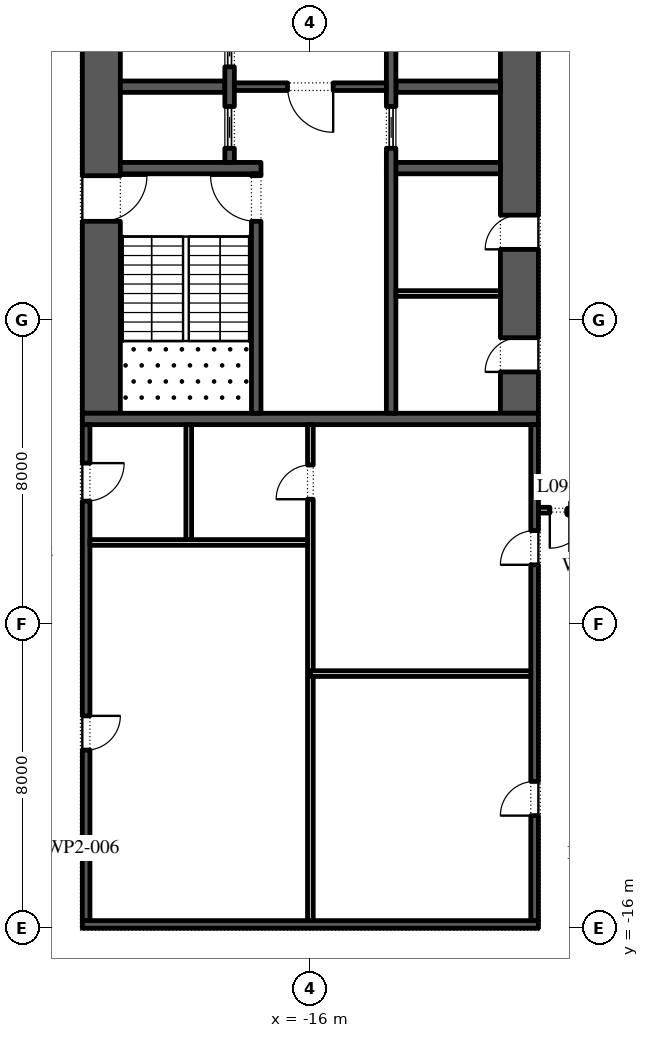
"""IFC4 building model, lengths in metres.
Left out: names, types, materials, properties, quantities, classifications, styles, units other than length and angle.
Written with IfcOpenShell. Run it as: python <this file> out.ifc"""

import sys

from ifc_helpers import new_model, si_unit, direction, frame, frame_2d, origin, place, context, subcontext, project, spatial, rectangle, extrude, element, fill, save


model = new_model("IFC4")
c1 = context("Model", 3, precision=1e-05, world=origin(), true_north=direction((0.0, 1.0)))
c2 = subcontext(c1, "Body", "Model", "MODEL_VIEW")
j1 = project(units=[si_unit("LENGTHUNIT", "METRE"), si_unit("PLANEANGLEUNIT", "RADIAN")], contexts=[c1])
p1 = place(None, origin())
s1 = spatial("IfcSite", under=j1, at=p1, CompositionType="ELEMENT")
p2 = place(p1, origin())
s2 = spatial("IfcBuilding", under=s1, at=p2, CompositionType="ELEMENT")
p3 = place(p2, frame((0.0, 0.0, 48.0)))
s3 = spatial("IfcBuildingStorey", under=s2, at=p3, CompositionType="ELEMENT", Elevation=48.0)
p4 = place(p3, frame((-21.5, -2.45, 0.0), z_axis=(0.0, 0.0, 1.0), x_axis=(0.0, 1.0, 0.0)))
e1 = element("IfcWall", 1, at=p4, inside=s3, PredefinedType="SHEAR", context=c2, shape_type="SweptSolid", body=[
    extrude(rectangle(XDim=27.9, YDim=1.0, at=frame_2d((13.95, 0.0))), origin(), (0.0, 0.0, 1.0), 4.0),
])
p5 = place(p4, frame((5.05, 0.0, 0.0)))
e2 = element("IfcOpeningElement", 2, at=p5, cuts=e1, PredefinedType="OPENING", context=c2, shape_type="SweptSolid", body=[
    extrude(rectangle(XDim=1.2, YDim=2.1, at=frame_2d((0.6, 1.05))), frame((0.0, 0.51, 0.0), z_axis=(0.0, -1.0, 0.0), x_axis=(1.0, 0.0, 0.0)), (0.0, 0.0, 1.0), 1.02),
])
p6 = place(p4, frame((21.65, 0.0, 0.0)))
e3 = element("IfcOpeningElement", 3, at=p6, cuts=e1, PredefinedType="OPENING", context=c2, shape_type="SweptSolid", body=[
    extrude(rectangle(XDim=1.2, YDim=2.1, at=frame_2d((0.6, 1.05))), frame((0.0, 0.51, 0.0), z_axis=(0.0, -1.0, 0.0), x_axis=(1.0, 0.0, 0.0)), (0.0, 0.0, 1.0), 1.02),
])
p7 = place(p3, frame((-10.5, -2.45, 0.0), z_axis=(0.0, 0.0, 1.0), x_axis=(0.0, 1.0, 0.0)))
e4 = element("IfcWall", 4, at=p7, inside=s3, PredefinedType="SHEAR", context=c2, shape_type="SweptSolid", body=[
    extrude(rectangle(XDim=27.9, YDim=1.0, at=frame_2d((13.95, 0.0))), origin(), (0.0, 0.0, 1.0), 4.0),
])
p8 = place(p7, frame((23.65, 0.0, 0.0)))
e5 = element("IfcOpeningElement", 5, at=p8, cuts=e4, PredefinedType="OPENING", context=c2, shape_type="SweptSolid", body=[
    extrude(rectangle(XDim=2.4, YDim=2.1, at=frame_2d((1.2, 1.05))), frame((0.0, 0.51, 0.0), z_axis=(0.0, -1.0, 0.0), x_axis=(1.0, 0.0, 0.0)), (0.0, 0.0, 1.0), 1.02),
])
p9 = place(p7, frame((1.087, 0.0, 0.0)))
e6 = element("IfcOpeningElement", 6, at=p9, cuts=e4, PredefinedType="OPENING", context=c2, shape_type="SweptSolid", body=[
    extrude(rectangle(XDim=0.9, YDim=2.1, at=frame_2d((0.45, 1.05))), frame((0.0, 0.51, 0.0), z_axis=(0.0, -1.0, 0.0), x_axis=(1.0, 0.0, 0.0)), (0.0, 0.0, 1.0), 1.02),
])
p10 = place(p7, frame((4.312, 0.0, 0.0)))
e7 = element("IfcOpeningElement", 7, at=p10, cuts=e4, PredefinedType="OPENING", context=c2, shape_type="SweptSolid", body=[
    extrude(rectangle(XDim=0.9, YDim=2.1, at=frame_2d((0.45, 1.05))), frame((0.0, 0.51, 0.0), z_axis=(0.0, -1.0, 0.0), x_axis=(1.0, 0.0, 0.0)), (0.0, 0.0, 1.0), 1.02),
])
p11 = place(p3, frame((-22.0, -2.6, 0.0), z_axis=(0.0, 0.0, 1.0), x_axis=(1.0, 0.0, 0.0)))
e8 = element("IfcWall", 8, at=p11, inside=s3, PredefinedType="SHEAR", context=c2, shape_type="SweptSolid", body=[
    extrude(rectangle(XDim=12.0, YDim=0.3, at=frame_2d((6.0, 0.0))), origin(), (0.0, 0.0, 1.0), 4.0),
])
p12 = place(p3, frame((-21.0, 4.0, 0.0), z_axis=(0.0, 0.0, 1.0), x_axis=(1.0, 0.0, 0.0)))
e9 = element("IfcWall", 9, at=p12, inside=s3, PredefinedType="SHEAR", context=c2, shape_type="SweptSolid", body=[
    extrude(rectangle(XDim=3.7, YDim=0.3, at=frame_2d((1.85, 0.0))), origin(), (0.0, 0.0, 1.0), 4.0),
])
p13 = place(p3, frame((-17.425, -2.45, 0.0), z_axis=(0.0, 0.0, 1.0), x_axis=(0.0, 1.0, 0.0)))
e10 = element("IfcWall", 10, at=p13, inside=s3, PredefinedType="SHEAR", context=c2, shape_type="SweptSolid", body=[
    extrude(rectangle(XDim=6.3, YDim=0.25, at=frame_2d((3.15, 0.0))), origin(), (0.0, 0.0, 1.0), 4.0),
])
p14 = place(p13, frame((5.05, 0.0, 0.0)))
e11 = element("IfcOpeningElement", 11, at=p14, cuts=e10, PredefinedType="OPENING", context=c2, shape_type="SweptSolid", body=[
    extrude(rectangle(XDim=1.2, YDim=2.1, at=frame_2d((0.6, 1.05))), frame((0.0, 0.135, 0.0), z_axis=(0.0, -1.0, 0.0), x_axis=(1.0, 0.0, 0.0)), (0.0, 0.0, 1.0), 0.27),
])
p15 = place(p3, frame((-21.0, 6.143, 0.0), z_axis=(0.0, 0.0, 1.0), x_axis=(1.0, 0.0, 0.0)))
e12 = element("IfcWall", 12, at=p15, inside=s3, PredefinedType="SHEAR", context=c2, shape_type="SweptSolid", body=[
    extrude(rectangle(XDim=2.75, YDim=0.3, at=frame_2d((1.375, 0.0))), origin(), (0.0, 0.0, 1.0), 4.0),
])
p16 = place(p3, frame((-18.125, 4.15, 0.0), z_axis=(0.0, 0.0, 1.0), x_axis=(0.0, 1.0, 0.0)))
e13 = element("IfcWall", 13, at=p16, inside=s3, PredefinedType="SHEAR", context=c2, shape_type="SweptSolid", body=[
    extrude(rectangle(XDim=14.7, YDim=0.25, at=frame_2d((7.35, 0.0))), origin(), (0.0, 0.0, 1.0), 4.0),
])
p17 = place(p16, frame((0.371, 0.0, 0.0)))
e14 = element("IfcOpeningElement", 14, at=p17, cuts=e13, PredefinedType="OPENING", context=c2, shape_type="SweptSolid", body=[
    extrude(rectangle(XDim=1.1, YDim=2.1, at=frame_2d((0.55, 1.05))), frame((0.0, 0.135, 0.0), z_axis=(0.0, -1.0, 0.0), x_axis=(1.0, 0.0, 0.0)), (0.0, 0.0, 1.0), 0.27),
])
p18 = place(p16, frame((2.514, 0.0, 0.0)))
e15 = element("IfcOpeningElement", 15, at=p18, cuts=e13, PredefinedType="OPENING", context=c2, shape_type="SweptSolid", body=[
    extrude(rectangle(XDim=1.1, YDim=2.1, at=frame_2d((0.55, 1.05))), frame((0.0, 0.135, 0.0), z_axis=(0.0, -1.0, 0.0), x_axis=(1.0, 0.0, 0.0)), (0.0, 0.0, 1.0), 0.27),
])
p19 = place(p16, frame((4.657, 0.0, 0.0)))
e16 = element("IfcOpeningElement", 16, at=p19, cuts=e13, PredefinedType="OPENING", context=c2, shape_type="SweptSolid", body=[
    extrude(rectangle(XDim=1.1, YDim=2.1, at=frame_2d((0.55, 1.05))), frame((0.0, 0.135, 0.0), z_axis=(0.0, -1.0, 0.0), x_axis=(1.0, 0.0, 0.0)), (0.0, 0.0, 1.0), 0.27),
])
p20 = place(p16, frame((6.8, 0.0, 0.0)))
e17 = element("IfcOpeningElement", 17, at=p20, cuts=e13, PredefinedType="OPENING", context=c2, shape_type="SweptSolid", body=[
    extrude(rectangle(XDim=1.1, YDim=2.1, at=frame_2d((0.55, 1.05))), frame((0.0, 0.135, 0.0), z_axis=(0.0, -1.0, 0.0), x_axis=(1.0, 0.0, 0.0)), (0.0, 0.0, 1.0), 0.27),
])
p21 = place(p16, frame((8.943, 0.0, 0.0)))
e18 = element("IfcOpeningElement", 18, at=p21, cuts=e13, PredefinedType="OPENING", context=c2, shape_type="SweptSolid", body=[
    extrude(rectangle(XDim=1.1, YDim=2.1, at=frame_2d((0.55, 1.05))), frame((0.0, 0.135, 0.0), z_axis=(0.0, -1.0, 0.0), x_axis=(1.0, 0.0, 0.0)), (0.0, 0.0, 1.0), 0.27),
])
p22 = place(p16, frame((11.086, 0.0, 0.0)))
e19 = element("IfcOpeningElement", 19, at=p22, cuts=e13, PredefinedType="OPENING", context=c2, shape_type="SweptSolid", body=[
    extrude(rectangle(XDim=1.1, YDim=2.1, at=frame_2d((0.55, 1.05))), frame((0.0, 0.135, 0.0), z_axis=(0.0, -1.0, 0.0), x_axis=(1.0, 0.0, 0.0)), (0.0, 0.0, 1.0), 0.27),
])
p23 = place(p16, frame((13.229, 0.0, 0.0)))
e20 = element("IfcOpeningElement", 20, at=p23, cuts=e13, PredefinedType="OPENING", context=c2, shape_type="SweptSolid", body=[
    extrude(rectangle(XDim=1.1, YDim=2.1, at=frame_2d((0.55, 1.05))), frame((0.0, 0.135, 0.0), z_axis=(0.0, -1.0, 0.0), x_axis=(1.0, 0.0, 0.0)), (0.0, 0.0, 1.0), 0.27),
])
p24 = place(p3, frame((-14.0, 4.0, 0.0), z_axis=(0.0, 0.0, 1.0), x_axis=(1.0, 0.0, 0.0)))
e21 = element("IfcWall", 21, at=p24, inside=s3, PredefinedType="SHEAR", context=c2, shape_type="SweptSolid", body=[
    extrude(rectangle(XDim=3.0, YDim=0.3, at=frame_2d((1.5, 0.0))), origin(), (0.0, 0.0, 1.0), 4.0),
])
p25 = place(p3, frame((-13.75, 6.143, 0.0), z_axis=(0.0, 0.0, 1.0), x_axis=(1.0, 0.0, 0.0)))
e22 = element("IfcWall", 22, at=p25, inside=s3, PredefinedType="SHEAR", context=c2, shape_type="SweptSolid", body=[
    extrude(rectangle(XDim=2.75, YDim=0.3, at=frame_2d((1.375, 0.0))), origin(), (0.0, 0.0, 1.0), 4.0),
])
p26 = place(p3, frame((-13.875, -2.45, 0.0), z_axis=(0.0, 0.0, 1.0), x_axis=(0.0, 1.0, 0.0)))
e23 = element("IfcWall", 23, at=p26, inside=s3, PredefinedType="SHEAR", context=c2, shape_type="SweptSolid", body=[
    extrude(rectangle(XDim=21.3, YDim=0.25, at=frame_2d((10.65, 0.0))), origin(), (0.0, 0.0, 1.0), 4.0),
])
p27 = place(p26, frame((14.571, 0.0, 0.0)))
e24 = element("IfcOpeningElement", 24, at=p27, cuts=e23, PredefinedType="OPENING", context=c2, shape_type="SweptSolid", body=[
    extrude(rectangle(XDim=0.9, YDim=2.1, at=frame_2d((0.45, 1.05))), frame((0.0, 0.135, 0.0), z_axis=(0.0, -1.0, 0.0), x_axis=(1.0, 0.0, 0.0)), (0.0, 0.0, 1.0), 0.27),
])
p28 = place(p26, frame((6.971, 0.0, 0.0)))
e25 = element("IfcOpeningElement", 25, at=p28, cuts=e23, PredefinedType="OPENING", context=c2, shape_type="SweptSolid", body=[
    extrude(rectangle(XDim=1.1, YDim=2.1, at=frame_2d((0.55, 1.05))), frame((0.0, 0.135, 0.0), z_axis=(0.0, -1.0, 0.0), x_axis=(1.0, 0.0, 0.0)), (0.0, 0.0, 1.0), 0.27),
])
p29 = place(p3, frame((-18.0, 6.143, 0.0), z_axis=(0.0, 0.0, 1.0), x_axis=(1.0, 0.0, 0.0)))
e26 = element("IfcWall", 26, at=p29, inside=s3, PredefinedType="SHEAR", context=c2, shape_type="SweptSolid", body=[
    extrude(rectangle(XDim=4.0, YDim=0.2, at=frame_2d((2.0, 0.0))), origin(), (0.0, 0.0, 1.0), 4.0),
])
p30 = place(p29, frame((1.4, 0.0, 0.0)))
e27 = element("IfcOpeningElement", 27, at=p30, cuts=e26, PredefinedType="OPENING", context=c2, shape_type="SweptSolid", body=[
    extrude(rectangle(XDim=1.2, YDim=2.1, at=frame_2d((0.6, 1.05))), frame((0.0, 0.11, 0.0), z_axis=(0.0, -1.0, 0.0), x_axis=(1.0, 0.0, 0.0)), (0.0, 0.0, 1.0), 0.22),
])
p31 = place(p3, frame((-13.75, 0.7, 0.0), z_axis=(0.0, 0.0, 1.0), x_axis=(1.0, 0.0, 0.0)))
e28 = element("IfcWall", 28, at=p31, inside=s3, PredefinedType="PARTITIONING", context=c2, shape_type="SweptSolid", body=[
    extrude(rectangle(XDim=2.75, YDim=0.15, at=frame_2d((1.375, 0.0))), origin(), (0.0, 0.0, 1.0), 4.0),
])
p32 = place(p3, frame((-21.9, -15.8, 0.0), z_axis=(0.0, 0.0, 1.0), x_axis=(0.0, 1.0, 0.0)))
e29 = element("IfcWall", 29, at=p32, inside=s3, PredefinedType="SHEAR", context=c2, shape_type="SweptSolid", body=[
    extrude(rectangle(XDim=13.05, YDim=0.2, at=frame_2d((6.525, 0.0))), origin(), (0.0, 0.0, 1.0), 4.0),
])
p33 = place(p32, frame((4.488, 0.0, 0.0)))
e30 = element("IfcOpeningElement", 30, at=p33, cuts=e29, PredefinedType="OPENING", context=c2, shape_type="SweptSolid", body=[
    extrude(rectangle(XDim=0.9, YDim=2.1, at=frame_2d((0.45, 1.05))), frame((0.0, 0.11, 0.0), z_axis=(0.0, -1.0, 0.0), x_axis=(1.0, 0.0, 0.0)), (0.0, 0.0, 1.0), 0.22),
])
p34 = place(p32, frame((11.038, 0.0, 0.0)))
e31 = element("IfcOpeningElement", 31, at=p34, cuts=e29, PredefinedType="OPENING", context=c2, shape_type="SweptSolid", body=[
    extrude(rectangle(XDim=1.0, YDim=2.1, at=frame_2d((0.5, 1.05))), frame((0.0, 0.11, 0.0), z_axis=(0.0, -1.0, 0.0), x_axis=(1.0, 0.0, 0.0)), (0.0, 0.0, 1.0), 0.22),
])
p35 = place(p3, frame((-10.1, -15.8, 0.0), z_axis=(0.0, 0.0, 1.0), x_axis=(0.0, 1.0, 0.0)))
e32 = element("IfcWall", 32, at=p35, inside=s3, PredefinedType="SHEAR", context=c2, shape_type="SweptSolid", body=[
    extrude(rectangle(XDim=13.05, YDim=0.2, at=frame_2d((6.525, 0.0))), origin(), (0.0, 0.0, 1.0), 4.0),
])
p36 = place(p35, frame((2.762, 0.0, 0.0)))
e33 = element("IfcOpeningElement", 33, at=p36, cuts=e32, PredefinedType="OPENING", context=c2, shape_type="SweptSolid", body=[
    extrude(rectangle(XDim=0.9, YDim=2.1, at=frame_2d((0.45, 1.05))), frame((0.0, 0.11, 0.0), z_axis=(0.0, -1.0, 0.0), x_axis=(1.0, 0.0, 0.0)), (0.0, 0.0, 1.0), 0.22),
])
p37 = place(p35, frame((9.363, 0.0, 0.0)))
e34 = element("IfcOpeningElement", 34, at=p37, cuts=e32, PredefinedType="OPENING", context=c2, shape_type="SweptSolid", body=[
    extrude(rectangle(XDim=0.9, YDim=2.1, at=frame_2d((0.45, 1.05))), frame((0.0, 0.11, 0.0), z_axis=(0.0, -1.0, 0.0), x_axis=(1.0, 0.0, 0.0)), (0.0, 0.0, 1.0), 0.22),
])
p38 = place(p3, frame((-22.0, -15.9, 0.0), z_axis=(0.0, 0.0, 1.0), x_axis=(1.0, 0.0, 0.0)))
e35 = element("IfcWall", 35, at=p38, inside=s3, PredefinedType="SHEAR", context=c2, shape_type="SweptSolid", body=[
    extrude(rectangle(XDim=12.0, YDim=0.2, at=frame_2d((6.0, 0.0))), origin(), (0.0, 0.0, 1.0), 4.0),
])
p39 = place(p3, frame((-16.0, -15.8, 0.0), z_axis=(0.0, 0.0, 1.0), x_axis=(0.0, 1.0, 0.0)))
e36 = element("IfcWall", 36, at=p39, inside=s3, PredefinedType="PARTITIONING", context=c2, shape_type="SweptSolid", body=[
    extrude(rectangle(XDim=13.05, YDim=0.15, at=frame_2d((6.525, 0.0))), origin(), (0.0, 0.0, 1.0), 4.0),
])
p40 = place(p39, frame((11.087, 0.0, 0.0)))
e37 = element("IfcOpeningElement", 37, at=p40, cuts=e36, PredefinedType="OPENING", context=c2, shape_type="SweptSolid", body=[
    extrude(rectangle(XDim=0.9, YDim=2.1, at=frame_2d((0.45, 1.05))), frame((0.0, 0.085, 0.0), z_axis=(0.0, -1.0, 0.0), x_axis=(1.0, 0.0, 0.0)), (0.0, 0.0, 1.0), 0.17),
])
p41 = place(p3, frame((-16.0, -9.3, 0.0), z_axis=(0.0, 0.0, 1.0), x_axis=(1.0, 0.0, 0.0)))
e38 = element("IfcWall", 38, at=p41, inside=s3, PredefinedType="PARTITIONING", context=c2, shape_type="SweptSolid", body=[
    extrude(rectangle(XDim=5.8, YDim=0.15, at=frame_2d((2.9, 0.0))), origin(), (0.0, 0.0, 1.0), 4.0),
])
p42 = place(p3, frame((-21.8, -5.85, 0.0), z_axis=(0.0, 0.0, 1.0), x_axis=(1.0, 0.0, 0.0)))
e39 = element("IfcWall", 39, at=p42, inside=s3, PredefinedType="PARTITIONING", context=c2, shape_type="SweptSolid", body=[
    extrude(rectangle(XDim=5.725, YDim=0.15, at=frame_2d((2.863, 0.0))), origin(), (0.0, 0.0, 1.0), 4.0),
])
p43 = place(p3, frame((-19.2, -5.775, 0.0), z_axis=(0.0, 0.0, 1.0), x_axis=(0.0, 1.0, 0.0)))
e40 = element("IfcWall", 40, at=p43, inside=s3, PredefinedType="PARTITIONING", context=c2, shape_type="SweptSolid", body=[
    extrude(rectangle(XDim=3.025, YDim=0.15, at=frame_2d((1.512, 0.0))), origin(), (0.0, 0.0, 1.0), 4.0),
])
p44 = place(p3, frame((-8.4, -5.0, 0.0), z_axis=(0.0, 0.0, 1.0), x_axis=(-1.0, 0.0, 0.0)))
e41 = element("IfcWall", 41, at=p44, inside=s3, PredefinedType="PARTITIONING", context=c2, shape_type="SweptSolid", body=[
    extrude(rectangle(XDim=1.6, YDim=0.15, at=frame_2d((0.8, 0.0))), origin(), (0.0, 0.0, 1.0), 4.0),
])
p45 = place(p44, frame((0.3, 0.0, 0.0)))
e42 = element("IfcOpeningElement", 42, at=p45, cuts=e41, PredefinedType="OPENING", context=c2, shape_type="SweptSolid", body=[
    extrude(rectangle(XDim=1.0, YDim=2.1, at=frame_2d((0.5, 1.05))), frame((0.0, 0.085, 0.0), z_axis=(0.0, -1.0, 0.0), x_axis=(1.0, 0.0, 0.0)), (0.0, 0.0, 1.0), 0.17),
])
p46 = place(p17, origin())
e43 = element("IfcDoor", 43, at=p46, inside=s3, OperationType="SLIDING_TO_LEFT", PredefinedType="DOOR", context=c2, shape_type="SweptSolid", body=[
    extrude(rectangle(XDim=1.1, YDim=2.1, at=frame_2d((0.55, 1.05))), frame((0.0, 0.025, 0.0), z_axis=(0.0, -1.0, 0.0), x_axis=(1.0, 0.0, 0.0)), (0.0, 0.0, 1.0), 0.05),
])
fill(e14, e43)
p47 = place(p18, origin())
e44 = element("IfcDoor", 44, at=p47, inside=s3, OperationType="SLIDING_TO_LEFT", PredefinedType="DOOR", context=c2, shape_type="SweptSolid", body=[
    extrude(rectangle(XDim=1.1, YDim=2.1, at=frame_2d((0.55, 1.05))), frame((0.0, 0.025, 0.0), z_axis=(0.0, -1.0, 0.0), x_axis=(1.0, 0.0, 0.0)), (0.0, 0.0, 1.0), 0.05),
])
fill(e15, e44)
p48 = place(p28, origin())
e45 = element("IfcDoor", 45, at=p48, inside=s3, OperationType="SLIDING_TO_LEFT", PredefinedType="DOOR", context=c2, shape_type="SweptSolid", body=[
    extrude(rectangle(XDim=1.1, YDim=2.1, at=frame_2d((0.55, 1.05))), frame((0.0, 0.025, 0.0), z_axis=(0.0, -1.0, 0.0), x_axis=(1.0, 0.0, 0.0)), (0.0, 0.0, 1.0), 0.05),
])
fill(e25, e45)
p49 = place(p30, frame((1.2, 0.0, 0.0), z_axis=(0.0, 0.0, 1.0), x_axis=(-1.0, 0.0, 0.0)))
e46 = element("IfcDoor", 46, at=p49, inside=s3, OperationType="SINGLE_SWING_RIGHT", PredefinedType="DOOR", context=c2, shape_type="SweptSolid", body=[
    extrude(rectangle(XDim=1.2, YDim=2.1, at=frame_2d((0.6, 1.05))), frame((0.0, 0.025, 0.0), z_axis=(0.0, -1.0, 0.0), x_axis=(1.0, 0.0, 0.0)), (0.0, 0.0, 1.0), 0.05),
])
fill(e27, e46)
p50 = place(p14, origin())
e47 = element("IfcDoor", 47, at=p50, inside=s3, OperationType="SINGLE_SWING_LEFT", PredefinedType="DOOR", context=c2, shape_type="SweptSolid", body=[
    extrude(rectangle(XDim=1.2, YDim=2.1, at=frame_2d((0.6, 1.05))), frame((0.0, 0.025, 0.0), z_axis=(0.0, -1.0, 0.0), x_axis=(1.0, 0.0, 0.0)), (0.0, 0.0, 1.0), 0.05),
])
fill(e11, e47)
p51 = place(p5, frame((1.2, 0.0, 0.0), z_axis=(0.0, 0.0, 1.0), x_axis=(-1.0, 0.0, 0.0)))
e48 = element("IfcDoor", 48, at=p51, inside=s3, OperationType="SINGLE_SWING_RIGHT", PredefinedType="DOOR", context=c2, shape_type="SweptSolid", body=[
    extrude(rectangle(XDim=1.2, YDim=2.1, at=frame_2d((0.6, 1.05))), frame((0.0, 0.025, 0.0), z_axis=(0.0, -1.0, 0.0), x_axis=(1.0, 0.0, 0.0)), (0.0, 0.0, 1.0), 0.05),
])
fill(e2, e48)
p52 = place(p9, origin())
e49 = element("IfcDoor", 49, at=p52, inside=s3, OperationType="SINGLE_SWING_RIGHT", PredefinedType="DOOR", context=c2, shape_type="SweptSolid", body=[
    extrude(rectangle(XDim=0.9, YDim=2.1, at=frame_2d((0.45, 1.05))), frame((0.0, 0.5, 0.0), z_axis=(0.0, -1.0, 0.0), x_axis=(1.0, 0.0, 0.0)), (0.0, 0.0, 1.0), 0.05),
])
fill(e6, e49)
p53 = place(p10, origin())
e50 = element("IfcDoor", 50, at=p53, inside=s3, OperationType="SINGLE_SWING_RIGHT", PredefinedType="DOOR", context=c2, shape_type="SweptSolid", body=[
    extrude(rectangle(XDim=0.9, YDim=2.1, at=frame_2d((0.45, 1.05))), frame((0.0, 0.5, 0.0), z_axis=(0.0, -1.0, 0.0), x_axis=(1.0, 0.0, 0.0)), (0.0, 0.0, 1.0), 0.05),
])
fill(e7, e50)
p54 = place(p33, frame((0.9, -0.15, 0.0), z_axis=(0.0, 0.0, 1.0), x_axis=(-1.0, 0.0, 0.0)))
e51 = element("IfcDoor", 51, at=p54, inside=s3, OperationType="SINGLE_SWING_RIGHT", PredefinedType="DOOR", context=c2, shape_type="SweptSolid", body=[
    extrude(rectangle(XDim=0.9, YDim=2.1, at=frame_2d((0.45, 1.05))), frame((0.0, -0.05, 0.0), z_axis=(0.0, -1.0, 0.0), x_axis=(1.0, 0.0, 0.0)), (0.0, 0.0, 1.0), 0.05),
])
fill(e30, e51)
p55 = place(p34, frame((1.0, -0.15, 0.0), z_axis=(0.0, 0.0, 1.0), x_axis=(-1.0, 0.0, 0.0)))
e52 = element("IfcDoor", 52, at=p55, inside=s3, OperationType="SINGLE_SWING_RIGHT", PredefinedType="DOOR", context=c2, shape_type="SweptSolid", body=[
    extrude(rectangle(XDim=1.0, YDim=2.1, at=frame_2d((0.5, 1.05))), frame((0.0, -0.05, 0.0), z_axis=(0.0, -1.0, 0.0), x_axis=(1.0, 0.0, 0.0)), (0.0, 0.0, 1.0), 0.05),
])
fill(e31, e52)
p56 = place(p40, origin())
e53 = element("IfcDoor", 53, at=p56, inside=s3, OperationType="SINGLE_SWING_RIGHT", PredefinedType="DOOR", context=c2, shape_type="SweptSolid", body=[
    extrude(rectangle(XDim=0.9, YDim=2.1, at=frame_2d((0.45, 1.05))), frame((0.0, 0.025, 0.0), z_axis=(0.0, -1.0, 0.0), x_axis=(1.0, 0.0, 0.0)), (0.0, 0.0, 1.0), 0.05),
])
fill(e37, e53)
p57 = place(p36, origin())
e54 = element("IfcDoor", 54, at=p57, inside=s3, OperationType="SINGLE_SWING_RIGHT", PredefinedType="DOOR", context=c2, shape_type="SweptSolid", body=[
    extrude(rectangle(XDim=0.9, YDim=2.1, at=frame_2d((0.45, 1.05))), frame((0.0, 0.1, 0.0), z_axis=(0.0, -1.0, 0.0), x_axis=(1.0, 0.0, 0.0)), (0.0, 0.0, 1.0), 0.05),
])
fill(e33, e54)
p58 = place(p37, origin())
e55 = element("IfcDoor", 55, at=p58, inside=s3, OperationType="SINGLE_SWING_RIGHT", PredefinedType="DOOR", context=c2, shape_type="SweptSolid", body=[
    extrude(rectangle(XDim=0.9, YDim=2.1, at=frame_2d((0.45, 1.05))), frame((0.0, 0.1, 0.0), z_axis=(0.0, -1.0, 0.0), x_axis=(1.0, 0.0, 0.0)), (0.0, 0.0, 1.0), 0.05),
])
fill(e34, e55)
p59 = place(p45, origin())
e56 = element("IfcDoor", 56, at=p59, inside=s3, OperationType="SINGLE_SWING_LEFT", PredefinedType="DOOR", context=c2, shape_type="SweptSolid", body=[
    extrude(rectangle(XDim=1.0, YDim=2.1, at=frame_2d((0.5, 1.05))), frame((0.0, 0.025, 0.0), z_axis=(0.0, -1.0, 0.0), x_axis=(1.0, 0.0, 0.0)), (0.0, 0.0, 1.0), 0.05),
])
fill(e42, e56)
save(model, sys.argv[1])
